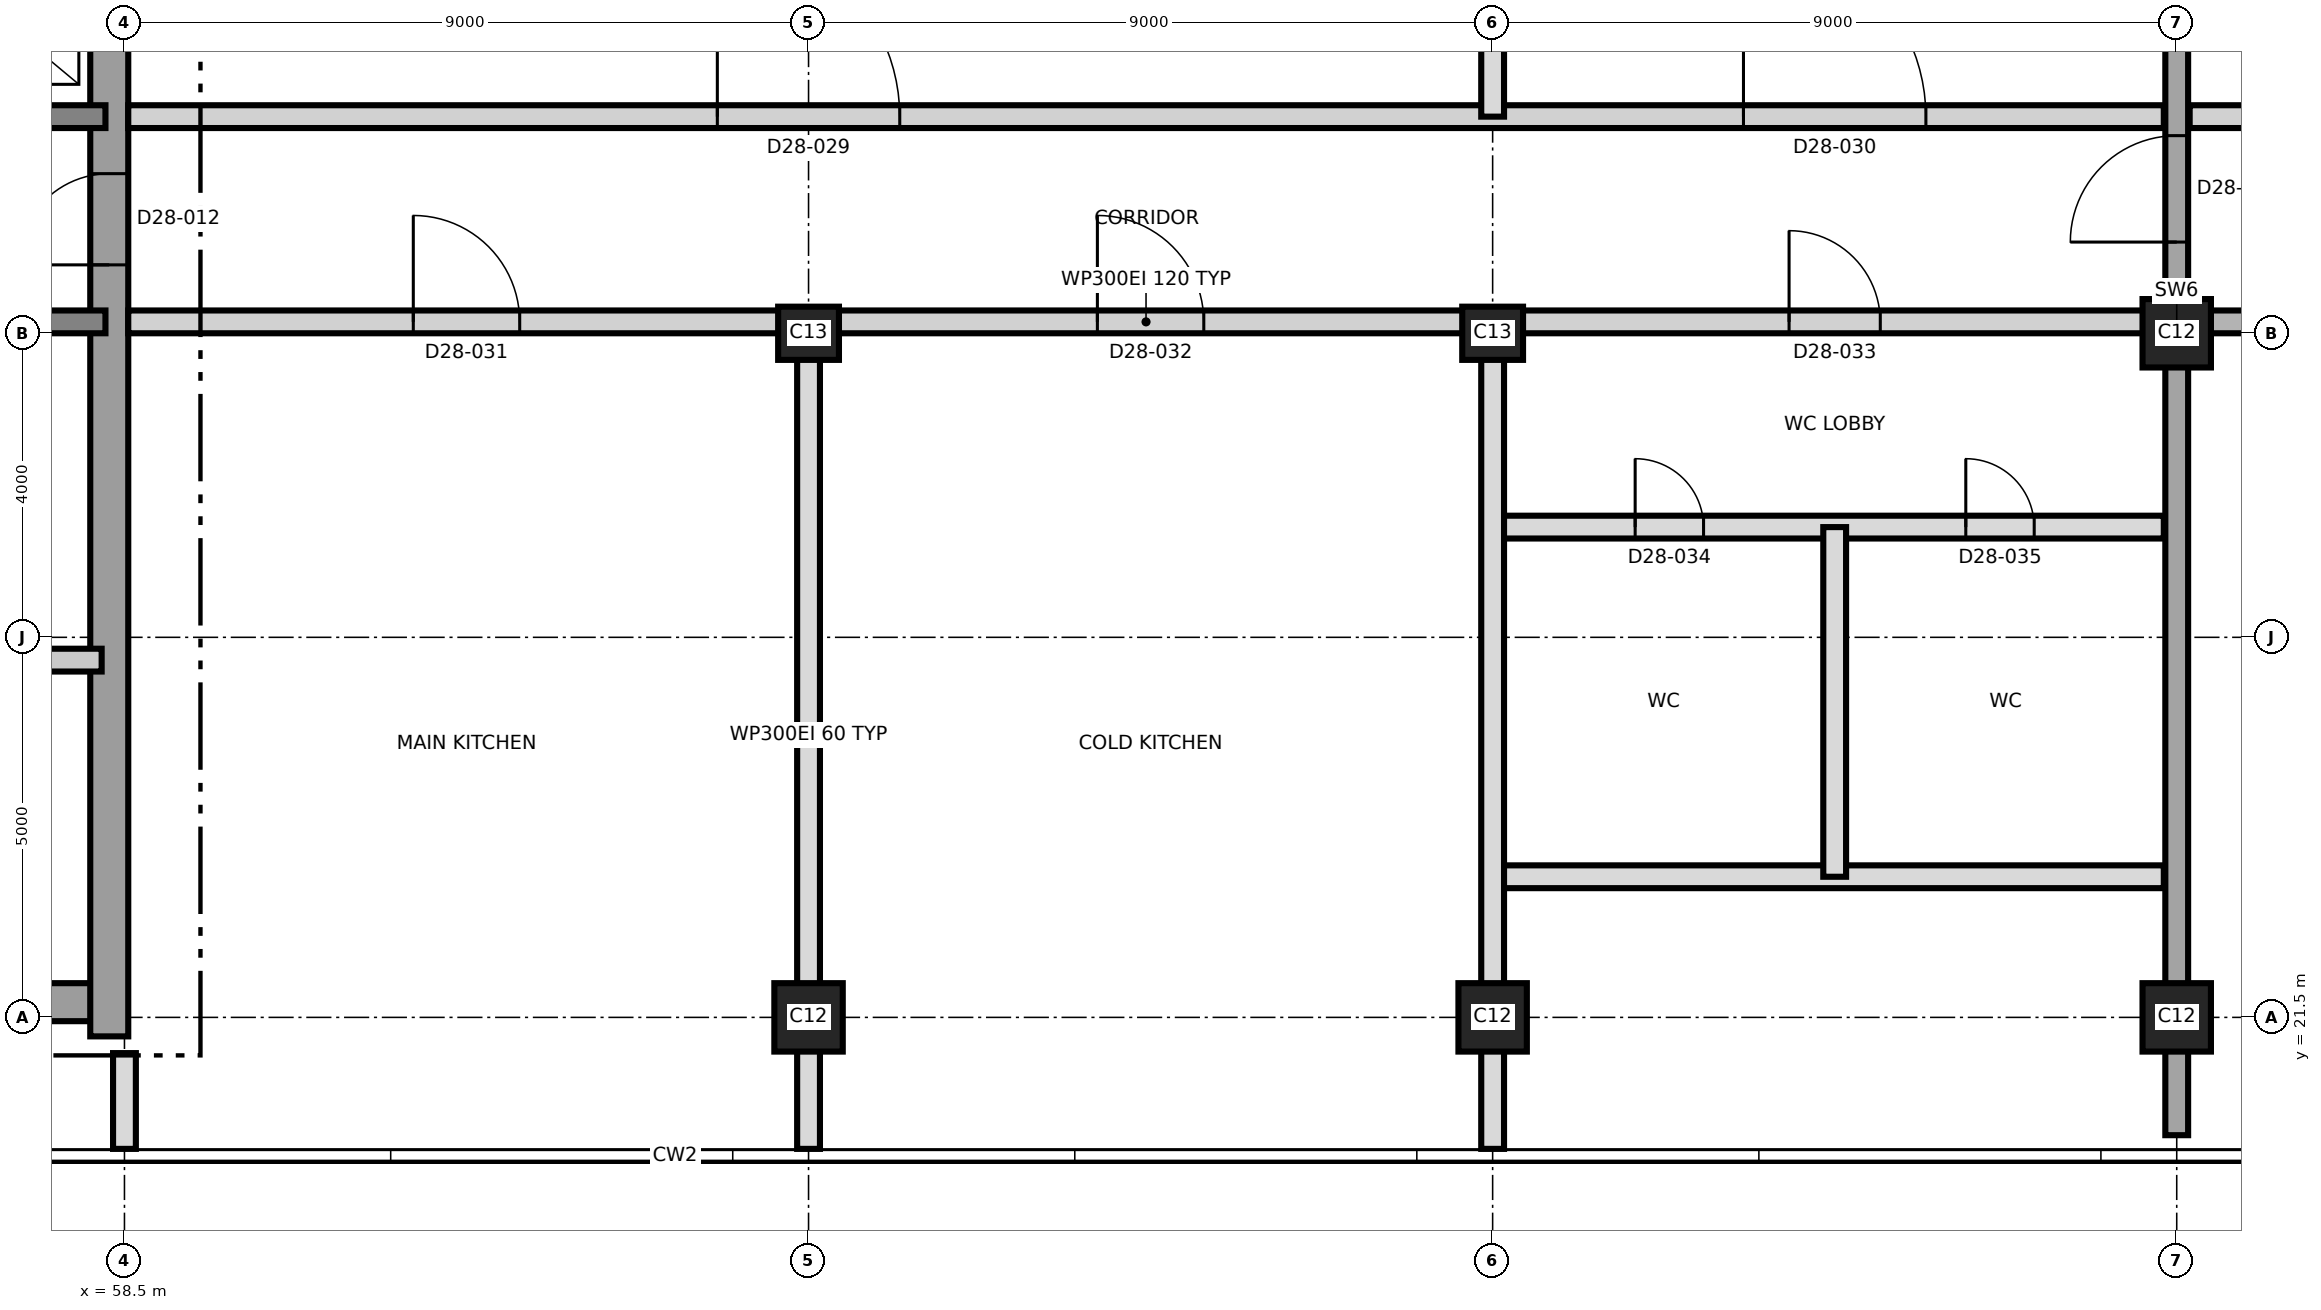
"""IFC4 building model, lengths in metres.
Left out: names, types, materials, properties, quantities, classifications, styles, units other than length and angle.
Written with IfcOpenShell. Run it as: python <this file> out.ifc"""

import sys

from ifc_helpers import new_model, si_unit, direction, frame, frame_2d, origin, origin_2d, place, context, subcontext, project, spatial, rectangle, extrude, element, fill, save


model = new_model("IFC4")
c1 = context("Model", 3, precision=1e-05, world=origin(), true_north=direction((0.0, 1.0)))
c2 = subcontext(c1, "Body", "Model", "MODEL_VIEW")
j1 = project(units=[si_unit("LENGTHUNIT", "METRE"), si_unit("PLANEANGLEUNIT", "RADIAN")], contexts=[c1])
p1 = place(None, origin())
s1 = spatial("IfcSite", under=j1, at=p1, CompositionType="ELEMENT")
p2 = place(p1, origin())
s2 = spatial("IfcBuilding", under=s1, at=p2, CompositionType="ELEMENT")
p3 = place(p2, frame((0.0, 0.0, 249.4)))
s3 = spatial("IfcBuildingStorey", under=s2, at=p3, CompositionType="ELEMENT", Elevation=249.4)
p4 = place(p3, frame((31.25, 21.7, 0.0), z_axis=(0.0, 0.0, 1.0), x_axis=(1.0, 0.0, 0.0)))
e1 = element("IfcWall", 1, at=p4, inside=s3, PredefinedType="SHEAR", context=c2, shape_type="SweptSolid", body=[
    extrude(rectangle(XDim=27.0, YDim=0.5, at=frame_2d((13.5, 0.0))), origin(), (0.0, 0.0, 1.0), 5.5),
])
p5 = place(p3, frame((58.3, 21.25, 0.0), z_axis=(0.0, 0.0, 1.0), x_axis=(0.0, 1.0, 0.0)))
e2 = element("IfcWall", 2, at=p5, inside=s3, PredefinedType="SHEAR", context=c2, shape_type="SweptSolid", body=[
    extrude(rectangle(XDim=18.5, YDim=0.5, at=frame_2d((9.25, 0.0))), origin(), (0.0, 0.0, 1.0), 5.5),
])
p6 = place(p5, frame((10.15, 0.0, 0.0)))
e3 = element("IfcOpeningElement", 3, at=p6, cuts=e2, PredefinedType="OPENING", context=c2, shape_type="SweptSolid", body=[
    extrude(rectangle(XDim=1.2, YDim=2.1, at=frame_2d((0.6, 1.05))), frame((0.0, 0.26, 0.0), z_axis=(0.0, -1.0, 0.0), x_axis=(1.0, 0.0, 0.0)), (0.0, 0.0, 1.0), 0.52),
])
p7 = place(p3, frame((31.75, 30.65, 0.0), z_axis=(0.0, 0.0, 1.0), x_axis=(1.0, 0.0, 0.0)))
e4 = element("IfcWall", 4, at=p7, inside=s3, PredefinedType="SHEAR", context=c2, shape_type="SweptSolid", body=[
    extrude(rectangle(XDim=26.5, YDim=0.3, at=frame_2d((13.25, 0.0))), origin(), (0.0, 0.0, 1.0), 5.5),
])
p8 = place(p7, frame((24.75, 0.0, 0.0)))
e5 = element("IfcOpeningElement", 5, at=p8, cuts=e4, PredefinedType="OPENING", context=c2, shape_type="SweptSolid", body=[
    extrude(rectangle(XDim=1.0, YDim=2.1, at=frame_2d((0.5, 1.05))), frame((0.0, 0.16, 0.0), z_axis=(0.0, -1.0, 0.0), x_axis=(1.0, 0.0, 0.0)), (0.0, 0.0, 1.0), 0.32),
])
p9 = place(p7, frame((4.05, 0.0, 0.0)))
e6 = element("IfcOpeningElement", 6, at=p9, cuts=e4, PredefinedType="OPENING", context=c2, shape_type="SweptSolid", body=[
    extrude(rectangle(XDim=1.0, YDim=2.1, at=frame_2d((0.5, 1.05))), frame((0.0, 0.16, 0.0), z_axis=(0.0, -1.0, 0.0), x_axis=(1.0, 0.0, 0.0)), (0.0, 0.0, 1.0), 0.32),
])
p10 = place(p3, frame((31.75, 33.35, 0.0), z_axis=(0.0, 0.0, 1.0), x_axis=(1.0, 0.0, 0.0)))
e7 = element("IfcWall", 7, at=p10, inside=s3, PredefinedType="SHEAR", context=c2, shape_type="SweptSolid", body=[
    extrude(rectangle(XDim=26.5, YDim=0.3, at=frame_2d((13.25, 0.0))), origin(), (0.0, 0.0, 1.0), 5.5),
])
p11 = place(p10, frame((13.9, 0.0, 0.0)))
e8 = element("IfcOpeningElement", 8, at=p11, cuts=e7, PredefinedType="OPENING", context=c2, shape_type="SweptSolid", body=[
    extrude(rectangle(XDim=1.4, YDim=2.1, at=frame_2d((0.7, 1.05))), frame((0.0, 0.16, 0.0), z_axis=(0.0, -1.0, 0.0), x_axis=(1.0, 0.0, 0.0)), (0.0, 0.0, 1.0), 0.32),
])
p12 = place(p10, frame((5.375, 0.0, 0.0)))
e9 = element("IfcOpeningElement", 9, at=p12, cuts=e7, PredefinedType="OPENING", context=c2, shape_type="SweptSolid", body=[
    extrude(rectangle(XDim=1.2, YDim=2.1, at=frame_2d((0.6, 1.05))), frame((0.0, 0.16, 0.0), z_axis=(0.0, -1.0, 0.0), x_axis=(1.0, 0.0, 0.0)), (0.0, 0.0, 1.0), 0.32),
])
p13 = place(p10, frame((19.925, 0.0, 0.0)))
e10 = element("IfcOpeningElement", 10, at=p13, cuts=e7, PredefinedType="OPENING", context=c2, shape_type="SweptSolid", body=[
    extrude(rectangle(XDim=1.2, YDim=2.1, at=frame_2d((0.6, 1.05))), frame((0.0, 0.16, 0.0), z_axis=(0.0, -1.0, 0.0), x_axis=(1.0, 0.0, 0.0)), (0.0, 0.0, 1.0), 0.32),
])
for number, where, z_axis, x_axis in (
    (11, (67.5, 21.5, 0.0), (0.0, 0.0, 1.0), (1.0, 0.0, 0.0)),
    (12, (76.5, 21.5, 0.0), (0.0, 0.0, 1.0), (1.0, 0.0, 0.0)),
    (13, (85.5, 21.5, 0.0), (0.0, 0.0, 1.0), (1.0, 0.0, 0.0)),
):
    element("IfcColumn", number, at=place(p3, frame(where, z_axis=z_axis, x_axis=x_axis)), inside=s3, PredefinedType="COLUMN", context=c2, shape_type="SweptSolid", body=[
        extrude(rectangle(XDim=0.9, YDim=0.9, at=origin_2d()), origin(), (0.0, 0.0, 1.0), 5.5),
    ])
for number, where, z_axis, x_axis in (
    (14, (67.5, 30.5, 0.0), (0.0, 0.0, 1.0), (1.0, 0.0, 0.0)),
    (15, (76.5, 30.5, 0.0), (0.0, 0.0, 1.0), (1.0, 0.0, 0.0)),
):
    element("IfcColumn", number, at=place(p3, frame(where, z_axis=z_axis, x_axis=x_axis)), inside=s3, PredefinedType="COLUMN", context=c2, shape_type="SweptSolid", body=[
        extrude(rectangle(XDim=0.8, YDim=0.7, at=origin_2d()), origin(), (0.0, 0.0, 1.0), 5.5),
    ])
p14 = place(p3, frame((85.5, 30.5, 0.0), z_axis=(0.0, 0.0, 1.0), x_axis=(1.0, 0.0, 0.0)))
e16 = element("IfcColumn", 16, at=p14, inside=s3, PredefinedType="COLUMN", context=c2, shape_type="SweptSolid", body=[
    extrude(rectangle(XDim=0.9, YDim=0.9, at=origin_2d()), origin(), (0.0, 0.0, 1.0), 5.5),
])
p15 = place(p3, frame((85.5, 19.95, 0.0), z_axis=(0.0, 0.0, 1.0), x_axis=(0.0, 1.0, 0.0)))
e17 = element("IfcWall", 17, at=p15, inside=s3, PredefinedType="SHEAR", context=c2, shape_type="SweptSolid", body=[
    extrude(rectangle(XDim=21.1, YDim=0.3, at=frame_2d((10.55, 0.0))), origin(), (0.0, 0.0, 1.0), 5.5),
])
p16 = place(p15, frame((11.75, 0.0, 0.0)))
e18 = element("IfcOpeningElement", 18, at=p16, cuts=e17, PredefinedType="OPENING", context=c2, shape_type="SweptSolid", body=[
    extrude(rectangle(XDim=1.4, YDim=2.1, at=frame_2d((0.7, 1.05))), frame((0.0, 0.16, 0.0), z_axis=(0.0, -1.0, 0.0), x_axis=(1.0, 0.0, 0.0)), (0.0, 0.0, 1.0), 0.32),
])
p17 = place(p3, frame((55.8, 26.2, 0.0), z_axis=(0.0, 0.0, 1.0), x_axis=(1.0, 0.0, 0.0)))
e19 = element("IfcWall", 19, at=p17, inside=s3, PredefinedType="PARTITIONING", context=c2, shape_type="SweptSolid", body=[
    extrude(rectangle(XDim=2.4, YDim=0.3, at=frame_2d((1.2, 0.0))), origin(), (0.0, 0.0, 1.0), 5.2),
])
p18 = place(p17, frame((0.75, 0.0, 0.0)))
e20 = element("IfcOpeningElement", 20, at=p18, cuts=e19, PredefinedType="OPENING", context=c2, shape_type="SweptSolid", body=[
    extrude(rectangle(XDim=0.9, YDim=2.1, at=frame_2d((0.45, 1.05))), frame((0.0, 0.16, 0.0), z_axis=(0.0, -1.0, 0.0), x_axis=(1.0, 0.0, 0.0)), (0.0, 0.0, 1.0), 0.32),
])
p19 = place(p3, frame((76.5, 23.35, 0.0), z_axis=(0.0, 0.0, 1.0), x_axis=(1.0, 0.0, 0.0)))
e21 = element("IfcWall", 21, at=p19, inside=s3, PredefinedType="PARTITIONING", context=c2, shape_type="SweptSolid", body=[
    extrude(rectangle(XDim=8.83, YDim=0.3, at=frame_2d((4.415, 0.0))), origin(), (0.0, 0.0, 1.0), 5.2),
])
p20 = place(p3, frame((76.5, 27.95, 0.0), z_axis=(0.0, 0.0, 1.0), x_axis=(1.0, 0.0, 0.0)))
e22 = element("IfcWall", 22, at=p20, inside=s3, PredefinedType="PARTITIONING", context=c2, shape_type="SweptSolid", body=[
    extrude(rectangle(XDim=8.83, YDim=0.3, at=frame_2d((4.415, 0.0))), origin(), (0.0, 0.0, 1.0), 5.2),
])
p21 = place(p20, frame((1.875, 0.0, 0.0)))
e23 = element("IfcOpeningElement", 23, at=p21, cuts=e22, PredefinedType="OPENING", context=c2, shape_type="SweptSolid", body=[
    extrude(rectangle(XDim=0.9, YDim=2.1, at=frame_2d((0.45, 1.05))), frame((0.0, 0.16, 0.0), z_axis=(0.0, -1.0, 0.0), x_axis=(1.0, 0.0, 0.0)), (0.0, 0.0, 1.0), 0.32),
])
p22 = place(p20, frame((6.225, 0.0, 0.0)))
e24 = element("IfcOpeningElement", 24, at=p22, cuts=e22, PredefinedType="OPENING", context=c2, shape_type="SweptSolid", body=[
    extrude(rectangle(XDim=0.9, YDim=2.1, at=frame_2d((0.45, 1.05))), frame((0.0, 0.16, 0.0), z_axis=(0.0, -1.0, 0.0), x_axis=(1.0, 0.0, 0.0)), (0.0, 0.0, 1.0), 0.32),
])
p23 = place(p3, frame((58.55, 30.65, 0.0), z_axis=(0.0, 0.0, 1.0), x_axis=(1.0, 0.0, 0.0)))
e25 = element("IfcWall", 25, at=p23, inside=s3, PredefinedType="PARTITIONING", context=c2, shape_type="SweptSolid", body=[
    extrude(rectangle(XDim=26.78, YDim=0.3, at=frame_2d((13.39, 0.0))), origin(), (0.0, 0.0, 1.0), 5.2),
])
p24 = place(p23, frame((3.75, 0.0, 0.0)))
e26 = element("IfcOpeningElement", 26, at=p24, cuts=e25, PredefinedType="OPENING", context=c2, shape_type="SweptSolid", body=[
    extrude(rectangle(XDim=1.4, YDim=2.1, at=frame_2d((0.7, 1.05))), frame((0.0, 0.16, 0.0), z_axis=(0.0, -1.0, 0.0), x_axis=(1.0, 0.0, 0.0)), (0.0, 0.0, 1.0), 0.32),
])
p25 = place(p23, frame((12.75, 0.0, 0.0)))
e27 = element("IfcOpeningElement", 27, at=p25, cuts=e25, PredefinedType="OPENING", context=c2, shape_type="SweptSolid", body=[
    extrude(rectangle(XDim=1.4, YDim=2.1, at=frame_2d((0.7, 1.05))), frame((0.0, 0.16, 0.0), z_axis=(0.0, -1.0, 0.0), x_axis=(1.0, 0.0, 0.0)), (0.0, 0.0, 1.0), 0.32),
])
p26 = place(p23, frame((21.85, 0.0, 0.0)))
e28 = element("IfcOpeningElement", 28, at=p26, cuts=e25, PredefinedType="OPENING", context=c2, shape_type="SweptSolid", body=[
    extrude(rectangle(XDim=1.2, YDim=2.1, at=frame_2d((0.6, 1.05))), frame((0.0, 0.16, 0.0), z_axis=(0.0, -1.0, 0.0), x_axis=(1.0, 0.0, 0.0)), (0.0, 0.0, 1.0), 0.32),
])
p27 = place(p3, frame((85.67, 30.65, 0.0), z_axis=(0.0, 0.0, 1.0), x_axis=(1.0, 0.0, 0.0)))
e29 = element("IfcWall", 29, at=p27, inside=s3, PredefinedType="SHEAR", context=c2, shape_type="SweptSolid", body=[
    extrude(rectangle(XDim=9.58, YDim=0.3, at=frame_2d((4.79, 0.0))), origin(), (0.0, 0.0, 1.0), 5.2),
])
p28 = place(p27, frame((2.08, 0.0, 0.0)))
e30 = element("IfcOpeningElement", 30, at=p28, cuts=e29, PredefinedType="OPENING", context=c2, shape_type="SweptSolid", body=[
    extrude(rectangle(XDim=1.2, YDim=2.1, at=frame_2d((0.6, 1.05))), frame((0.0, 0.16, 0.0), z_axis=(0.0, -1.0, 0.0), x_axis=(1.0, 0.0, 0.0)), (0.0, 0.0, 1.0), 0.32),
])
p29 = place(p27, frame((5.63, 0.0, 0.0)))
e31 = element("IfcOpeningElement", 31, at=p29, cuts=e29, PredefinedType="OPENING", context=c2, shape_type="SweptSolid", body=[
    extrude(rectangle(XDim=1.0, YDim=2.1, at=frame_2d((0.5, 1.05))), frame((0.0, 0.16, 0.0), z_axis=(0.0, -1.0, 0.0), x_axis=(1.0, 0.0, 0.0)), (0.0, 0.0, 1.0), 0.32),
])
p30 = place(p3, frame((58.55, 33.35, 0.0), z_axis=(0.0, 0.0, 1.0), x_axis=(1.0, 0.0, 0.0)))
e32 = element("IfcWall", 32, at=p30, inside=s3, PredefinedType="PARTITIONING", context=c2, shape_type="SweptSolid", body=[
    extrude(rectangle(XDim=26.78, YDim=0.3, at=frame_2d((13.39, 0.0))), origin(), (0.0, 0.0, 1.0), 5.2),
])
p31 = place(p30, frame((7.75, 0.0, 0.0)))
e33 = element("IfcOpeningElement", 33, at=p31, cuts=e32, PredefinedType="OPENING", context=c2, shape_type="SweptSolid", body=[
    extrude(rectangle(XDim=2.4, YDim=2.4, at=frame_2d((1.2, 1.2))), frame((0.0, 0.16, 0.0), z_axis=(0.0, -1.0, 0.0), x_axis=(1.0, 0.0, 0.0)), (0.0, 0.0, 1.0), 0.32),
])
p32 = place(p30, frame((21.25, 0.0, 0.0)))
e34 = element("IfcOpeningElement", 34, at=p32, cuts=e32, PredefinedType="OPENING", context=c2, shape_type="SweptSolid", body=[
    extrude(rectangle(XDim=2.4, YDim=2.4, at=frame_2d((1.2, 1.2))), frame((0.0, 0.16, 0.0), z_axis=(0.0, -1.0, 0.0), x_axis=(1.0, 0.0, 0.0)), (0.0, 0.0, 1.0), 0.32),
])
p33 = place(p3, frame((85.67, 33.35, 0.0), z_axis=(0.0, 0.0, 1.0), x_axis=(1.0, 0.0, 0.0)))
e35 = element("IfcWall", 35, at=p33, inside=s3, PredefinedType="PARTITIONING", context=c2, shape_type="SweptSolid", body=[
    extrude(rectangle(XDim=9.58, YDim=0.3, at=frame_2d((4.79, 0.0))), origin(), (0.0, 0.0, 1.0), 5.2),
])
p34 = place(p33, frame((1.83, 0.0, 0.0)))
e36 = element("IfcOpeningElement", 36, at=p34, cuts=e35, PredefinedType="OPENING", context=c2, shape_type="SweptSolid", body=[
    extrude(rectangle(XDim=1.0, YDim=2.1, at=frame_2d((0.5, 1.05))), frame((0.0, 0.16, 0.0), z_axis=(0.0, -1.0, 0.0), x_axis=(1.0, 0.0, 0.0)), (0.0, 0.0, 1.0), 0.32),
])
p35 = place(p33, frame((5.63, 0.0, 0.0)))
e37 = element("IfcOpeningElement", 37, at=p35, cuts=e35, PredefinedType="OPENING", context=c2, shape_type="SweptSolid", body=[
    extrude(rectangle(XDim=1.0, YDim=2.1, at=frame_2d((0.5, 1.05))), frame((0.0, 0.16, 0.0), z_axis=(0.0, -1.0, 0.0), x_axis=(1.0, 0.0, 0.0)), (0.0, 0.0, 1.0), 0.32),
])
p36 = place(p3, frame((58.5, 19.77, 0.0), z_axis=(0.0, 0.0, 1.0), x_axis=(0.0, 1.0, 0.0)))
e38 = element("IfcWall", 38, at=p36, inside=s3, PredefinedType="PARTITIONING", context=c2, shape_type="SweptSolid", body=[
    extrude(rectangle(XDim=1.26, YDim=0.3, at=frame_2d((0.63, 0.0))), origin(), (0.0, 0.0, 1.0), 5.2),
])
for number, where, z_axis, x_axis in (
    (39, (67.5, 19.77, 0.0), (0.0, 0.0, 1.0), (0.0, 1.0, 0.0)),
    (40, (76.5, 19.77, 0.0), (0.0, 0.0, 1.0), (0.0, 1.0, 0.0)),
):
    element("IfcWall", number, at=place(p3, frame(where, z_axis=z_axis, x_axis=x_axis)), inside=s3, PredefinedType="PARTITIONING", context=c2, shape_type="SweptSolid", body=[
        extrude(rectangle(XDim=10.88, YDim=0.3, at=frame_2d((5.44, 0.0))), origin(), (0.0, 0.0, 1.0), 5.2),
    ])
p37 = place(p3, frame((76.5, 33.35, 0.0), z_axis=(0.0, 0.0, 1.0), x_axis=(0.0, 1.0, 0.0)))
e41 = element("IfcWall", 41, at=p37, inside=s3, PredefinedType="PARTITIONING", context=c2, shape_type="SweptSolid", body=[
    extrude(rectangle(XDim=7.88, YDim=0.3, at=frame_2d((3.94, 0.0))), origin(), (0.0, 0.0, 1.0), 5.2),
])
p38 = place(p3, frame((81.0, 23.35, 0.0), z_axis=(0.0, 0.0, 1.0), x_axis=(0.0, 1.0, 0.0)))
e42 = element("IfcWall", 42, at=p38, inside=s3, PredefinedType="PARTITIONING", context=c2, shape_type="SweptSolid", body=[
    extrude(rectangle(XDim=4.6, YDim=0.3, at=frame_2d((2.3, 0.0))), origin(), (0.0, 0.0, 1.0), 5.2),
])
p39 = place(p6, origin())
e43 = element("IfcDoor", 43, at=p39, inside=s3, OperationType="SINGLE_SWING_LEFT", PredefinedType="DOOR", context=c2, shape_type="SweptSolid", body=[
    extrude(rectangle(XDim=1.2, YDim=2.1, at=frame_2d((0.6, 1.05))), frame((0.0, 0.025, 0.0), z_axis=(0.0, -1.0, 0.0), x_axis=(1.0, 0.0, 0.0)), (0.0, 0.0, 1.0), 0.05),
])
fill(e3, e43)
p40 = place(p31, origin())
e44 = element("IfcDoor", 44, at=p40, inside=s3, OperationType="SINGLE_SWING_LEFT", PredefinedType="DOOR", context=c2, shape_type="SweptSolid", body=[
    extrude(rectangle(XDim=2.4, YDim=2.4, at=frame_2d((1.2, 1.2))), frame((0.0, 0.025, 0.0), z_axis=(0.0, -1.0, 0.0), x_axis=(1.0, 0.0, 0.0)), (0.0, 0.0, 1.0), 0.05),
])
fill(e33, e44)
p41 = place(p32, origin())
e45 = element("IfcDoor", 45, at=p41, inside=s3, OperationType="SINGLE_SWING_LEFT", PredefinedType="DOOR", context=c2, shape_type="SweptSolid", body=[
    extrude(rectangle(XDim=2.4, YDim=2.4, at=frame_2d((1.2, 1.2))), frame((0.0, 0.025, 0.0), z_axis=(0.0, -1.0, 0.0), x_axis=(1.0, 0.0, 0.0)), (0.0, 0.0, 1.0), 0.05),
])
fill(e34, e45)
p42 = place(p24, origin())
e46 = element("IfcDoor", 46, at=p42, inside=s3, OperationType="SINGLE_SWING_LEFT", PredefinedType="DOOR", context=c2, shape_type="SweptSolid", body=[
    extrude(rectangle(XDim=1.4, YDim=2.1, at=frame_2d((0.7, 1.05))), frame((0.0, 0.025, 0.0), z_axis=(0.0, -1.0, 0.0), x_axis=(1.0, 0.0, 0.0)), (0.0, 0.0, 1.0), 0.05),
])
fill(e26, e46)
p43 = place(p25, origin())
e47 = element("IfcDoor", 47, at=p43, inside=s3, OperationType="SINGLE_SWING_LEFT", PredefinedType="DOOR", context=c2, shape_type="SweptSolid", body=[
    extrude(rectangle(XDim=1.4, YDim=2.1, at=frame_2d((0.7, 1.05))), frame((0.0, 0.025, 0.0), z_axis=(0.0, -1.0, 0.0), x_axis=(1.0, 0.0, 0.0)), (0.0, 0.0, 1.0), 0.05),
])
fill(e27, e47)
p44 = place(p26, origin())
e48 = element("IfcDoor", 48, at=p44, inside=s3, OperationType="SINGLE_SWING_LEFT", PredefinedType="DOOR", context=c2, shape_type="SweptSolid", body=[
    extrude(rectangle(XDim=1.2, YDim=2.1, at=frame_2d((0.6, 1.05))), frame((0.0, 0.025, 0.0), z_axis=(0.0, -1.0, 0.0), x_axis=(1.0, 0.0, 0.0)), (0.0, 0.0, 1.0), 0.05),
])
fill(e28, e48)
p45 = place(p21, origin())
e49 = element("IfcDoor", 49, at=p45, inside=s3, OperationType="SINGLE_SWING_LEFT", PredefinedType="DOOR", context=c2, shape_type="SweptSolid", body=[
    extrude(rectangle(XDim=0.9, YDim=2.1, at=frame_2d((0.45, 1.05))), frame((0.0, 0.025, 0.0), z_axis=(0.0, -1.0, 0.0), x_axis=(1.0, 0.0, 0.0)), (0.0, 0.0, 1.0), 0.05),
])
fill(e23, e49)
p46 = place(p22, origin())
e50 = element("IfcDoor", 50, at=p46, inside=s3, OperationType="SINGLE_SWING_RIGHT", PredefinedType="DOOR", context=c2, shape_type="SweptSolid", body=[
    extrude(rectangle(XDim=0.9, YDim=2.1, at=frame_2d((0.45, 1.05))), frame((0.0, 0.025, 0.0), z_axis=(0.0, -1.0, 0.0), x_axis=(1.0, 0.0, 0.0)), (0.0, 0.0, 1.0), 0.05),
])
fill(e24, e50)
p47 = place(p16, origin())
e51 = element("IfcDoor", 51, at=p47, inside=s3, OperationType="SINGLE_SWING_RIGHT", PredefinedType="DOOR", context=c2, shape_type="SweptSolid", body=[
    extrude(rectangle(XDim=1.4, YDim=2.1, at=frame_2d((0.7, 1.05))), frame((0.0, 0.025, 0.0), z_axis=(0.0, -1.0, 0.0), x_axis=(1.0, 0.0, 0.0)), (0.0, 0.0, 1.0), 0.05),
])
fill(e18, e51)
save(model, sys.argv[1])
